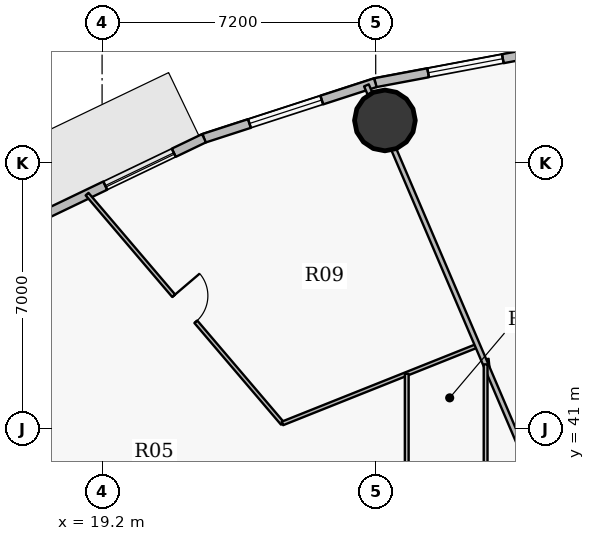
"""IFC4 building model, lengths in metres.
Left out: names, types, materials, properties, quantities, classifications, styles, units other than length and angle.
Written with IfcOpenShell. Run it as: python <this file> out.ifc"""

import sys

from ifc_helpers import new_model, si_unit, direction, frame, frame_2d, origin, origin_2d, place, context, subcontext, project, spatial, rectangle, hollow_circle, extrude, source, transform, mapped, element, fill, save


model = new_model("IFC4")
c1 = context("Model", 3, precision=1e-05, world=origin(), true_north=direction((0.0, 1.0)))
c2 = subcontext(c1, "Body", "Model", "MODEL_VIEW")
j1 = project(units=[si_unit("LENGTHUNIT", "METRE"), si_unit("PLANEANGLEUNIT", "RADIAN")], contexts=[c1])
p1 = place(None, origin())
s1 = spatial("IfcSite", under=j1, at=p1, CompositionType="ELEMENT")
p2 = place(p1, origin())
s2 = spatial("IfcBuilding", under=s1, at=p2, CompositionType="ELEMENT")
p3 = place(p2, frame((0.0, 0.0, 70.2)))
s3 = spatial("IfcBuildingStorey", under=s2, at=p3, CompositionType="ELEMENT", Elevation=70.2)
p4 = place(p3, frame((26.642, 49.12, 0.0), z_axis=(0.0, 0.0, 1.0), x_axis=(1.0, 0.0, 0.0)))
e1 = element("IfcColumn", 1, at=p4, inside=s3, PredefinedType="COLUMN", context=c2, shape_type="SweptSolid", body=[
    extrude(hollow_circle(Radius=0.8, WallThickness=0.045, at=origin_2d()), origin(), (0.0, 0.0, 1.0), 4.2),
])
p5 = place(p3, frame((26.389, 50.113, 0.0), z_axis=(0.0, 0.0, 1.0), x_axis=(0.982791952378, 0.184715939598, 0.0)))
e2 = element("IfcWall", 2, at=p5, inside=s3, PredefinedType="SOLIDWALL", context=c2, shape_type="SweptSolid", body=[
    extrude(rectangle(XDim=4.828, YDim=0.24, at=frame_2d((2.414, 0.0))), origin(), (0.0, 0.0, 1.0), 3.95),
])
p6 = place(p5, frame((1.414, 0.0, 0.9)))
e3 = element("IfcOpeningElement", 3, at=p6, cuts=e2, PredefinedType="OPENING", context=c2, shape_type="SweptSolid", body=[
    extrude(rectangle(XDim=2.0, YDim=1.75, at=origin_2d()), frame((1.0, 0.13, 0.875), z_axis=(0.0, -1.0, 0.0), x_axis=(1.0, 0.0, 0.0)), (0.0, 0.0, 1.0), 0.26),
])
p7 = place(p3, frame((21.882, 48.651, 0.0), z_axis=(0.0, 0.0, 1.0), x_axis=(0.951207699013, 0.308551313946, 0.0)))
e4 = element("IfcWall", 4, at=p7, inside=s3, PredefinedType="SOLIDWALL", context=c2, shape_type="SweptSolid", body=[
    extrude(rectangle(XDim=4.739, YDim=0.24, at=frame_2d((2.369, 0.0))), origin(), (0.0, 0.0, 1.0), 3.95),
])
p8 = place(p7, frame((1.258, 0.0, 0.9)))
e5 = element("IfcOpeningElement", 5, at=p8, cuts=e4, PredefinedType="OPENING", context=c2, shape_type="SweptSolid", body=[
    extrude(rectangle(XDim=2.0, YDim=1.75, at=origin_2d()), frame((1.0, 0.13, 0.875), z_axis=(0.0, -1.0, 0.0), x_axis=(1.0, 0.0, 0.0)), (0.0, 0.0, 1.0), 0.26),
])
p9 = place(p3, frame((17.723, 46.656, 0.0), z_axis=(0.0, 0.0, 1.0), x_axis=(0.901601503137, 0.432567601123, 0.0)))
e6 = element("IfcWall", 6, at=p9, inside=s3, PredefinedType="SOLIDWALL", context=c2, shape_type="SweptSolid", body=[
    extrude(rectangle(XDim=4.613, YDim=0.24, at=frame_2d((2.306, 0.0))), origin(), (0.0, 0.0, 1.0), 3.95),
])
p10 = place(p9, frame((1.731, 0.0, 0.9)))
e7 = element("IfcOpeningElement", 7, at=p10, cuts=e6, PredefinedType="OPENING", context=c2, shape_type="SweptSolid", body=[
    extrude(rectangle(XDim=2.0, YDim=1.75, at=origin_2d()), frame((1.0, 0.13, 0.875), z_axis=(0.0, -1.0, 0.0), x_axis=(1.0, 0.0, 0.0)), (0.0, 0.0, 1.0), 0.26),
])
p11 = place(p3, frame((11.882, 42.228, 0.0), z_axis=(0.0, 0.0, 1.0), x_axis=(0.845549287721, -0.533897370319, 0.0)))
e8 = element("IfcWall", 8, at=p11, inside=s3, PredefinedType="PARTITIONING", context=c2, shape_type="SweptSolid", body=[
    extrude(rectangle(XDim=8.55, YDim=0.1, at=frame_2d((4.275, 0.0))), origin(), (0.0, 0.0, 1.0), 3.335),
])
p12 = place(p11, frame((3.825, 0.0, 0.0)))
e9 = element("IfcOpeningElement", 9, at=p12, cuts=e8, PredefinedType="OPENING", context=c2, shape_type="SweptSolid", body=[
    extrude(rectangle(XDim=0.9, YDim=2.1, at=origin_2d()), frame((0.45, 0.06, 1.05), z_axis=(0.0, -1.0, 0.0), x_axis=(1.0, 0.0, 0.0)), (0.0, 0.0, 1.0), 0.12),
])
p13 = place(p3, frame((18.805, 47.181, 0.0), z_axis=(0.0, 0.0, 1.0), x_axis=(0.648556358155, -0.761166637667, 0.0)))
e10 = element("IfcWall", 10, at=p13, inside=s3, PredefinedType="PARTITIONING", context=c2, shape_type="SweptSolid", body=[
    extrude(rectangle(XDim=7.926, YDim=0.1, at=frame_2d((3.963, 0.0))), origin(), (0.0, 0.0, 1.0), 3.335),
])
p14 = place(p13, frame((3.513, 0.0, 0.0)))
e11 = element("IfcOpeningElement", 11, at=p14, cuts=e10, PredefinedType="OPENING", context=c2, shape_type="SweptSolid", body=[
    extrude(rectangle(XDim=0.9, YDim=2.1, at=origin_2d()), frame((0.45, 0.06, 1.05), z_axis=(0.0, -1.0, 0.0), x_axis=(1.0, 0.0, 0.0)), (0.0, 0.0, 1.0), 0.12),
])
p15 = place(p3, frame((23.946, 41.147, 0.0), z_axis=(0.0, 0.0, 1.0), x_axis=(0.928805222761, 0.370568290834, 0.0)))
e12 = element("IfcWall", 12, at=p15, inside=s3, PredefinedType="PARTITIONING", context=c2, shape_type="SweptSolid", body=[
    extrude(rectangle(XDim=5.529, YDim=0.1, at=frame_2d((2.764, 0.0))), origin(), (0.0, 0.0, 1.0), 3.285),
])
p16 = place(p3, frame((26.156, 50.043, 0.0), z_axis=(0.0, 0.0, 1.0), x_axis=(0.392844637537, -0.919604855771, 0.0)))
e13 = element("IfcWall", 13, at=p16, inside=s3, PredefinedType="PARTITIONING", context=c2, shape_type="SweptSolid", body=[
    extrude(rectangle(XDim=13.987, YDim=0.135, at=frame_2d((6.993, 0.0))), origin(), (0.0, 0.0, 1.0), 3.285),
])
p17 = place(p3, frame((27.217, 36.65, 0.0), z_axis=(0.0, 0.0, 1.0), x_axis=(0.0, 1.0, 0.0)))
e14 = element("IfcWall", 14, at=p17, inside=s3, PredefinedType="PARTITIONING", context=c2, shape_type="SweptSolid", body=[
    extrude(rectangle(XDim=5.802, YDim=0.1, at=frame_2d((2.901, 0.0))), origin(), (0.0, 0.0, 1.0), 3.95),
])
p18 = place(p17, frame((2.451, 0.0, 0.0)))
e15 = element("IfcOpeningElement", 15, at=p18, cuts=e14, PredefinedType="OPENING", context=c2, shape_type="SweptSolid", body=[
    extrude(rectangle(XDim=0.9, YDim=2.1, at=origin_2d()), frame((0.45, 0.06, 1.05), z_axis=(0.0, -1.0, 0.0), x_axis=(1.0, 0.0, 0.0)), (0.0, 0.0, 1.0), 0.12),
])
p19 = place(p3, frame((29.292, 36.65, 0.0), z_axis=(0.0, 0.0, 1.0), x_axis=(0.0, 1.0, 0.0)))
e16 = element("IfcWall", 16, at=p19, inside=s3, PredefinedType="PARTITIONING", context=c2, shape_type="SweptSolid", body=[
    extrude(rectangle(XDim=6.052, YDim=0.1, at=frame_2d((3.026, 0.0))), origin(), (0.0, 0.0, 1.0), 3.285),
])
p20 = place(p19, frame((2.616, 0.0, 0.0)))
e17 = element("IfcOpeningElement", 17, at=p20, cuts=e16, PredefinedType="OPENING", context=c2, shape_type="SweptSolid", body=[
    extrude(rectangle(XDim=0.82, YDim=2.1, at=origin_2d()), frame((0.41, 0.06, 1.05), z_axis=(0.0, -1.0, 0.0), x_axis=(1.0, 0.0, 0.0)), (0.0, 0.0, 1.0), 0.12),
])
m1 = source(origin(), c2, "Body", "SweptSolid", [
    extrude(rectangle(XDim=2.0, YDim=1.75, at=origin_2d()), frame((1.0, 0.03, 0.875), z_axis=(0.0, -1.0, 0.0), x_axis=(1.0, 0.0, 0.0)), (0.0, 0.0, 1.0), 0.06),
])
p21 = place(p6, origin())
e18 = element("IfcWindow", 18, at=p21, inside=s3, PartitioningType="DOUBLE_PANEL_VERTICAL", PredefinedType="WINDOW", context=c2, shape_type="MappedRepresentation", body=[
    mapped(m1, transform((0.0, 0.0, 0.0), x_axis=(1.0, 0.0, 0.0), y_axis=(0.0, 1.0, 0.0), z_axis=(0.0, 0.0, 1.0), scale=1.0)),
])
fill(e3, e18)
p22 = place(p8, origin())
e19 = element("IfcWindow", 19, at=p22, inside=s3, PartitioningType="DOUBLE_PANEL_VERTICAL", PredefinedType="WINDOW", context=c2, shape_type="MappedRepresentation", body=[
    mapped(m1, transform((0.0, 0.0, 0.0), x_axis=(1.0, 0.0, 0.0), y_axis=(0.0, 1.0, 0.0), z_axis=(0.0, 0.0, 1.0), scale=1.0)),
])
fill(e5, e19)
p23 = place(p10, origin())
e20 = element("IfcWindow", 20, at=p23, inside=s3, PartitioningType="DOUBLE_PANEL_VERTICAL", PredefinedType="WINDOW", context=c2, shape_type="MappedRepresentation", body=[
    mapped(m1, transform((0.0, 0.0, 0.0), x_axis=(1.0, 0.0, 0.0), y_axis=(0.0, 1.0, 0.0), z_axis=(0.0, 0.0, 1.0), scale=1.0)),
])
fill(e7, e20)
m2 = source(origin(), c2, "Body", "SweptSolid", [
    extrude(rectangle(XDim=0.9, YDim=2.1, at=origin_2d()), frame((0.45, 0.025, 1.05), z_axis=(0.0, -1.0, 0.0), x_axis=(1.0, 0.0, 0.0)), (0.0, 0.0, 1.0), 0.05),
])
p24 = place(p14, origin())
e21 = element("IfcDoor", 21, at=p24, inside=s3, OperationType="SINGLE_SWING_LEFT", PredefinedType="DOOR", context=c2, shape_type="MappedRepresentation", body=[
    mapped(m2, transform((0.0, 0.0, 0.0), x_axis=(1.0, 0.0, 0.0), y_axis=(0.0, 1.0, 0.0), z_axis=(0.0, 0.0, 1.0), scale=1.0)),
])
fill(e11, e21)
save(model, sys.argv[1])
